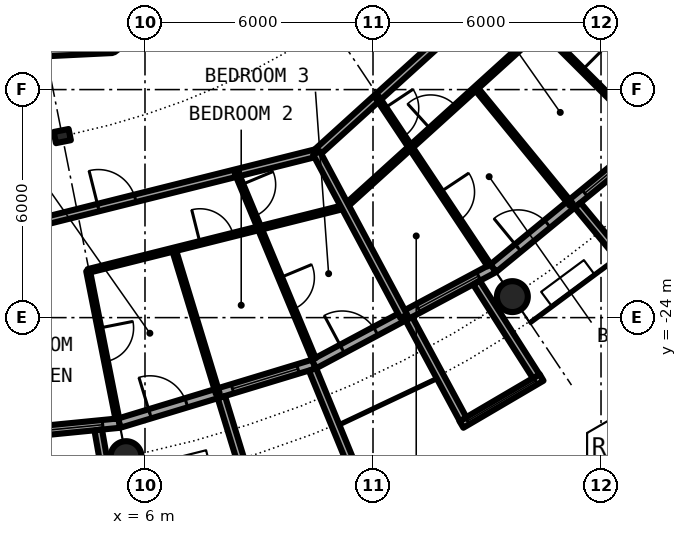
"""IFC4 building model, lengths in metres.
Left out: names, types, materials, properties, quantities, classifications, styles, units other than length and angle.
Written with IfcOpenShell. Run it as: python <this file> out.ifc"""

import sys

from ifc_helpers import new_model, si_unit, direction, frame, frame_2d, origin, origin_2d, place, context, subcontext, project, spatial, rectangle, circle, hollow_circle, i_section, extrude, element, fill, save


model = new_model("IFC4")
c1 = context("Model", 3, precision=1e-05, world=origin(), true_north=direction((0.0, 1.0)))
c2 = subcontext(c1, "Body", "Model", "MODEL_VIEW")
j1 = project(units=[si_unit("LENGTHUNIT", "METRE"), si_unit("PLANEANGLEUNIT", "RADIAN")], contexts=[c1])
p1 = place(None, origin())
s1 = spatial("IfcSite", under=j1, at=p1, CompositionType="ELEMENT")
p2 = place(p1, origin())
s2 = spatial("IfcBuilding", under=s1, at=p2, CompositionType="ELEMENT")
p3 = place(p2, frame((0.0, 0.0, 190.2)))
s3 = spatial("IfcBuildingStorey", under=s2, at=p3, CompositionType="ELEMENT", Elevation=190.2)
for number, where, z_axis, x_axis in (
    (1, (5.501, -27.658, 0.0), (0.0, 0.0, 1.0), (1.0, 0.0, 0.0)),
    (2, (15.667, -23.448, 0.0), (0.0, 0.0, 1.0), (1.0, 0.0, 0.0)),
):
    element("IfcColumn", number, at=place(p3, frame(where, z_axis=z_axis, x_axis=x_axis)), inside=s3, PredefinedType="COLUMN", context=c2, shape_type="SweptSolid", body=[
        extrude(hollow_circle(Radius=0.406, WallThickness=0.03, at=origin_2d()), origin(), (0.0, 0.0, 1.0), 3.05),
    ])
p4 = place(p3, frame((3.824, -19.223, 0.0), z_axis=(0.0, 0.0, 1.0), x_axis=(0.195090322016, -0.980785280403, 0.0)))
e3 = element("IfcColumn", 3, at=p4, inside=s3, PredefinedType="COLUMN", context=c2, shape_type="SweptSolid", body=[
    extrude(i_section(OverallWidth=0.3, OverallDepth=0.4, WebThickness=0.013, FlangeThickness=0.024, FilletRadius=0.027, at=origin_2d()), origin(), (0.0, 0.0, 1.0), 3.05),
])
p5 = place(p3, frame((0.0, -27.3, 0.0), z_axis=(0.0, 0.0, 1.0), x_axis=(0.995173996315, 0.098126026407, 0.0)))
e4 = element("IfcWall", 4, at=p5, inside=s3, PredefinedType="SOLIDWALL", context=c2, shape_type="SweptSolid", body=[
    extrude(rectangle(XDim=5.352, YDim=0.25, at=frame_2d((2.676, 0.0))), origin(), (0.0, 0.0, 1.0), 2.7),
])
p6 = place(p5, frame((0.841, 0.0, 0.0)))
e5 = element("IfcOpeningElement", 5, at=p6, cuts=e4, PredefinedType="OPENING", context=c2, shape_type="SweptSolid", body=[
    extrude(rectangle(XDim=1.0, YDim=2.2, at=frame_2d((0.5, 1.1))), frame((0.0, 0.135, 0.0), z_axis=(0.0, -1.0, 0.0), x_axis=(1.0, 0.0, 0.0)), (0.0, 0.0, 1.0), 0.27),
])
p7 = place(p5, frame((3.111, 0.0, 0.3)))
e6 = element("IfcOpeningElement", 6, at=p7, cuts=e4, PredefinedType="OPENING", context=c2, shape_type="SweptSolid", body=[
    extrude(rectangle(XDim=1.8, YDim=2.1, at=frame_2d((0.9, 1.05))), frame((0.0, 0.135, 0.0), z_axis=(0.0, -1.0, 0.0), x_axis=(1.0, 0.0, 0.0)), (0.0, 0.0, 1.0), 0.27),
])
p8 = place(p3, frame((4.769, -26.956, -0.03), z_axis=(0.0, 0.0, 1.0), x_axis=(0.174056778901, -0.984735618183, 0.0)))
e7 = element("IfcWall", 7, at=p8, inside=s3, PredefinedType="SOLIDWALL", context=c2, shape_type="SweptSolid", body=[
    extrude(rectangle(XDim=2.925, YDim=0.2, at=frame_2d((1.462, 0.0))), origin(), (0.0, 0.0, 1.0), 2.73),
])
p9 = place(p3, frame((5.326, -26.775, 0.0), z_axis=(0.0, 0.0, 1.0), x_axis=(0.956965678721, 0.290201119486, 0.0)))
e8 = element("IfcWall", 8, at=p9, inside=s3, PredefinedType="SOLIDWALL", context=c2, shape_type="SweptSolid", body=[
    extrude(rectangle(XDim=5.351, YDim=0.25, at=frame_2d((2.676, 0.0))), origin(), (0.0, 0.0, 1.0), 2.7),
])
p10 = place(p9, frame((0.841, 0.0, 0.0)))
e9 = element("IfcOpeningElement", 9, at=p10, cuts=e8, PredefinedType="OPENING", context=c2, shape_type="SweptSolid", body=[
    extrude(rectangle(XDim=1.0, YDim=2.2, at=frame_2d((0.5, 1.1))), frame((0.0, 0.135, 0.0), z_axis=(0.0, -1.0, 0.0), x_axis=(1.0, 0.0, 0.0)), (0.0, 0.0, 1.0), 0.27),
])
p11 = place(p9, frame((3.111, 0.0, 0.3)))
e10 = element("IfcOpeningElement", 10, at=p11, cuts=e8, PredefinedType="OPENING", context=c2, shape_type="SweptSolid", body=[
    extrude(rectangle(XDim=1.8, YDim=2.1, at=frame_2d((0.9, 1.05))), frame((0.0, 0.135, 0.0), z_axis=(0.0, -1.0, 0.0), x_axis=(1.0, 0.0, 0.0)), (0.0, 0.0, 1.0), 0.27),
])
p12 = place(p3, frame((8.009, -26.092, -0.03), z_axis=(0.0, 0.0, 1.0), x_axis=(0.293406695073, -0.955987715029, 0.0)))
e11 = element("IfcWall", 11, at=p12, inside=s3, PredefinedType="SOLIDWALL", context=c2, shape_type="SweptSolid", body=[
    extrude(rectangle(XDim=3.006, YDim=0.2, at=frame_2d((1.503, 0.0))), origin(), (0.0, 0.0, 1.0), 2.73),
])
p13 = place(p3, frame((10.409, -25.364, -0.03), z_axis=(0.0, 0.0, 1.0), x_axis=(0.379509886562, -0.925187681501, 0.0)))
e12 = element("IfcWall", 12, at=p13, inside=s3, PredefinedType="SOLIDWALL", context=c2, shape_type="SweptSolid", body=[
    extrude(rectangle(XDim=2.883, YDim=0.2, at=frame_2d((1.441, 0.0))), origin(), (0.0, 0.0, 1.0), 2.73),
])
p14 = place(p3, frame((10.447, -25.222, 0.0), z_axis=(0.0, 0.0, 1.0), x_axis=(0.881915646801, 0.471407246368, 0.0)))
e13 = element("IfcWall", 13, at=p14, inside=s3, PredefinedType="SOLIDWALL", context=c2, shape_type="SweptSolid", body=[
    extrude(rectangle(XDim=5.352, YDim=0.25, at=frame_2d((2.676, 0.0))), origin(), (0.0, 0.0, 1.0), 2.7),
])
p15 = place(p14, frame((0.841, 0.0, 0.0)))
e14 = element("IfcOpeningElement", 14, at=p15, cuts=e13, PredefinedType="OPENING", context=c2, shape_type="SweptSolid", body=[
    extrude(rectangle(XDim=1.0, YDim=2.2, at=frame_2d((0.5, 1.1))), frame((0.0, 0.135, 0.0), z_axis=(0.0, -1.0, 0.0), x_axis=(1.0, 0.0, 0.0)), (0.0, 0.0, 1.0), 0.27),
])
p16 = place(p14, frame((3.111, 0.0, 0.3)))
e15 = element("IfcOpeningElement", 15, at=p16, cuts=e13, PredefinedType="OPENING", context=c2, shape_type="SweptSolid", body=[
    extrude(rectangle(XDim=1.8, YDim=2.1, at=frame_2d((0.9, 1.05))), frame((0.0, 0.135, 0.0), z_axis=(0.0, -1.0, 0.0), x_axis=(1.0, 0.0, 0.0)), (0.0, 0.0, 1.0), 0.27),
])
p17 = place(p3, frame((14.327, -26.812, -0.03), z_axis=(0.0, 0.0, 1.0), x_axis=(0.862403467503, 0.506221551535, 0.0)))
e16 = element("IfcWall", 16, at=p17, inside=s3, PredefinedType="SOLIDWALL", context=c2, shape_type="SweptSolid", body=[
    extrude(rectangle(XDim=2.446, YDim=0.2, at=frame_2d((1.223, 0.0))), origin(), (0.0, 0.0, 1.0), 2.73),
])
p18 = place(p17, frame((0.183, 0.0, 0.33)))
e17 = element("IfcOpeningElement", 17, at=p18, cuts=e16, PredefinedType="OPENING", context=c2, shape_type="SweptSolid", body=[
    extrude(circle(Radius=1.04, at=frame_2d((1.04, 1.04))), frame((0.0, 0.11, 0.0), z_axis=(0.0, -1.0, 0.0), x_axis=(1.0, 0.0, 0.0)), (0.0, 0.0, 1.0), 0.22),
])
p19 = place(p3, frame((12.945, -24.029, -0.03), z_axis=(0.0, 0.0, 1.0), x_axis=(0.474424310775, -0.88029629861, 0.0)))
e18 = element("IfcWall", 18, at=p19, inside=s3, PredefinedType="SOLIDWALL", context=c2, shape_type="SweptSolid", body=[
    extrude(rectangle(XDim=3.006, YDim=0.2, at=frame_2d((1.503, 0.0))), origin(), (0.0, 0.0, 1.0), 2.73),
])
p20 = place(p3, frame((14.722, -23.079, -0.03), z_axis=(0.0, 0.0, 1.0), x_axis=(0.537572179146, -0.843217737129, 0.0)))
e19 = element("IfcWall", 19, at=p20, inside=s3, PredefinedType="SOLIDWALL", context=c2, shape_type="SweptSolid", body=[
    extrude(rectangle(XDim=2.924, YDim=0.2, at=frame_2d((1.462, 0.0))), origin(), (0.0, 0.0, 1.0), 2.73),
])
p21 = place(p3, frame((15.167, -22.699, 0.0), z_axis=(0.0, 0.0, 1.0), x_axis=(0.773019449054, 0.634382322723, 0.0)))
e20 = element("IfcWall", 20, at=p21, inside=s3, PredefinedType="SOLIDWALL", context=c2, shape_type="SweptSolid", body=[
    extrude(rectangle(XDim=5.352, YDim=0.25, at=frame_2d((2.676, 0.0))), origin(), (0.0, 0.0, 1.0), 2.7),
])
p22 = place(p21, frame((0.841, 0.0, 0.0)))
e21 = element("IfcOpeningElement", 21, at=p22, cuts=e20, PredefinedType="OPENING", context=c2, shape_type="SweptSolid", body=[
    extrude(rectangle(XDim=1.0, YDim=2.2, at=frame_2d((0.5, 1.1))), frame((0.0, 0.135, 0.0), z_axis=(0.0, -1.0, 0.0), x_axis=(1.0, 0.0, 0.0)), (0.0, 0.0, 1.0), 0.27),
])
p23 = place(p21, frame((3.111, 0.0, 0.3)))
e22 = element("IfcOpeningElement", 22, at=p23, cuts=e20, PredefinedType="OPENING", context=c2, shape_type="SweptSolid", body=[
    extrude(rectangle(XDim=1.8, YDim=2.1, at=frame_2d((0.9, 1.05))), frame((0.0, 0.135, 0.0), z_axis=(0.0, -1.0, 0.0), x_axis=(1.0, 0.0, 0.0)), (0.0, 0.0, 1.0), 0.27),
])
p24 = place(p3, frame((17.384, -21.041, -0.03), z_axis=(0.0, 0.0, 1.0), x_axis=(0.63709551667, -0.770784861449, 0.0)))
e23 = element("IfcWall", 23, at=p24, inside=s3, PredefinedType="SOLIDWALL", context=c2, shape_type="SweptSolid", body=[
    extrude(rectangle(XDim=3.006, YDim=0.2, at=frame_2d((1.503, 0.0))), origin(), (0.0, 0.0, 1.0), 2.73),
])
p25 = place(p3, frame((4.502, -22.773, 0.0), z_axis=(0.0, 0.0, 1.0), x_axis=(0.970080680347, 0.24278277043, 0.0)))
e24 = element("IfcWall", 24, at=p25, inside=s3, PredefinedType="PARTITIONING", context=c2, shape_type="SweptSolid", body=[
    extrude(rectangle(XDim=6.973, YDim=0.1, at=frame_2d((3.486, 0.0))), origin(), (0.0, 0.0, 1.0), 2.7),
])
p26 = place(p25, frame((3.037, 0.0, 0.0)))
e25 = element("IfcOpeningElement", 25, at=p26, cuts=e24, PredefinedType="OPENING", context=c2, shape_type="SweptSolid", body=[
    extrude(rectangle(XDim=0.9, YDim=2.3, at=frame_2d((0.45, 1.15))), frame((0.0, 0.06, 0.0), z_axis=(0.0, -1.0, 0.0), x_axis=(1.0, 0.0, 0.0)), (0.0, 0.0, 1.0), 0.12),
])
p27 = place(p3, frame((11.266, -21.078, 0.0), z_axis=(0.0, 0.0, 1.0), x_axis=(0.741084540886, 0.671411724101, 0.0)))
e26 = element("IfcWall", 26, at=p27, inside=s3, PredefinedType="PARTITIONING", context=c2, shape_type="SweptSolid", body=[
    extrude(rectangle(XDim=6.963, YDim=0.1, at=frame_2d((3.481, 0.0))), origin(), (0.0, 0.0, 1.0), 2.7),
])
p28 = place(p27, frame((3.035, 0.0, 0.0)))
e27 = element("IfcOpeningElement", 27, at=p28, cuts=e26, PredefinedType="OPENING", context=c2, shape_type="SweptSolid", body=[
    extrude(rectangle(XDim=0.9, YDim=2.3, at=frame_2d((0.45, 1.15))), frame((0.0, 0.06, 0.0), z_axis=(0.0, -1.0, 0.0), x_axis=(1.0, 0.0, 0.0)), (0.0, 0.0, 1.0), 0.12),
])
p29 = place(p3, frame((-0.005, -22.301, 0.0), z_axis=(0.0, 0.0, 1.0), x_axis=(0.970023226325, 0.243012222716, 0.0)))
e28 = element("IfcWall", 28, at=p29, inside=s3, PredefinedType="PARTITIONING", context=c2, shape_type="SweptSolid", body=[
    extrude(rectangle(XDim=10.847, YDim=0.2, at=frame_2d((5.424, 0.0))), origin(), (0.0, 0.0, 1.0), 2.7),
])
p30 = place(p29, frame((4.924, 0.0, 0.0)))
e29 = element("IfcOpeningElement", 29, at=p30, cuts=e28, PredefinedType="OPENING", context=c2, shape_type="SweptSolid", body=[
    extrude(rectangle(XDim=1.0, YDim=2.3, at=frame_2d((0.5, 1.15))), frame((0.0, 0.11, 0.0), z_axis=(0.0, -1.0, 0.0), x_axis=(1.0, 0.0, 0.0)), (0.0, 0.0, 1.0), 0.22),
])
p31 = place(p3, frame((10.51, -19.669, 0.0), z_axis=(0.0, 0.0, 1.0), x_axis=(0.74093897184, 0.671572363941, 0.0)))
e30 = element("IfcWall", 30, at=p31, inside=s3, PredefinedType="PARTITIONING", context=c2, shape_type="SweptSolid", body=[
    extrude(rectangle(XDim=10.84, YDim=0.2, at=frame_2d((5.42, 0.0))), origin(), (0.0, 0.0, 1.0), 2.7),
])
p32 = place(p31, frame((4.922, 0.0, 0.0)))
e31 = element("IfcOpeningElement", 31, at=p32, cuts=e30, PredefinedType="OPENING", context=c2, shape_type="SweptSolid", body=[
    extrude(rectangle(XDim=1.0, YDim=2.3, at=frame_2d((0.5, 1.15))), frame((0.0, 0.11, 0.0), z_axis=(0.0, -1.0, 0.0), x_axis=(1.0, 0.0, 0.0)), (0.0, 0.0, 1.0), 0.22),
])
p33 = place(p3, frame((-3.453, -17.361, 0.0), z_axis=(0.0, 0.0, 1.0), x_axis=(0.998789433108, 0.049190124121, 0.0)))
e32 = element("IfcWall", 32, at=p33, inside=s3, PredefinedType="PARTITIONING", context=c2, shape_type="SweptSolid", body=[
    extrude(rectangle(XDim=8.601, YDim=0.2, at=frame_2d((4.301, 0.0))), origin(), (0.0, 0.0, 1.0), 2.7),
])
p34 = place(p33, frame((3.803, 0.0, 0.0)))
e33 = element("IfcOpeningElement", 33, at=p34, cuts=e32, PredefinedType="OPENING", context=c2, shape_type="SweptSolid", body=[
    extrude(rectangle(XDim=1.0, YDim=2.3, at=frame_2d((0.5, 1.15))), frame((0.0, 0.11, 0.0), z_axis=(0.0, -1.0, 0.0), x_axis=(1.0, 0.0, 0.0)), (0.0, 0.0, 1.0), 0.22),
])
p35 = place(p3, frame((4.503, -22.772, 0.0), z_axis=(0.0, 0.0, 1.0), x_axis=(0.194089507313, -0.980983824103, 0.0)))
e34 = element("IfcWall", 34, at=p35, inside=s3, PredefinedType="PARTITIONING", context=c2, shape_type="SweptSolid", body=[
    extrude(rectangle(XDim=3.962, YDim=0.1, at=frame_2d((1.981, 0.0))), origin(), (0.0, 0.0, 1.0), 2.7),
])
p36 = place(p35, frame((1.531, 0.0, 0.0)))
e35 = element("IfcOpeningElement", 35, at=p36, cuts=e34, PredefinedType="OPENING", context=c2, shape_type="SweptSolid", body=[
    extrude(rectangle(XDim=0.9, YDim=2.3, at=frame_2d((0.45, 1.15))), frame((0.0, 0.06, 0.0), z_axis=(0.0, -1.0, 0.0), x_axis=(1.0, 0.0, 0.0)), (0.0, 0.0, 1.0), 0.12),
])
p37 = place(p3, frame((6.76, -22.207, 0.0), z_axis=(0.0, 0.0, 1.0), x_axis=(0.291291575636, -0.956634317785, 0.0)))
e36 = element("IfcWall", 36, at=p37, inside=s3, PredefinedType="PARTITIONING", context=c2, shape_type="SweptSolid", body=[
    extrude(rectangle(XDim=3.962, YDim=0.1, at=frame_2d((1.981, 0.0))), origin(), (0.0, 0.0, 1.0), 2.7),
])
p38 = place(p3, frame((8.41, -20.193, 0.0), z_axis=(0.0, 0.0, 1.0), x_axis=(0.384363513821, -0.923181828917, 0.0)))
e37 = element("IfcWall", 37, at=p38, inside=s3, PredefinedType="PARTITIONING", context=c2, shape_type="SweptSolid", body=[
    extrude(rectangle(XDim=5.3, YDim=0.1, at=frame_2d((2.65, 0.0))), origin(), (0.0, 0.0, 1.0), 2.7),
])
p39 = place(p38, frame((0.335, 0.0, 0.0)))
e38 = element("IfcOpeningElement", 38, at=p39, cuts=e37, PredefinedType="OPENING", context=c2, shape_type="SweptSolid", body=[
    extrude(rectangle(XDim=0.9, YDim=2.3, at=frame_2d((0.45, 1.15))), frame((0.0, 0.06, 0.0), z_axis=(0.0, -1.0, 0.0), x_axis=(1.0, 0.0, 0.0)), (0.0, 0.0, 1.0), 0.12),
])
p40 = place(p38, frame((2.985, 0.0, 0.0)))
e39 = element("IfcOpeningElement", 39, at=p40, cuts=e37, PredefinedType="OPENING", context=c2, shape_type="SweptSolid", body=[
    extrude(rectangle(XDim=0.9, YDim=2.3, at=frame_2d((0.45, 1.15))), frame((0.0, 0.06, 0.0), z_axis=(0.0, -1.0, 0.0), x_axis=(1.0, 0.0, 0.0)), (0.0, 0.0, 1.0), 0.12),
])
p41 = place(p3, frame((10.512, -19.667, 0.0), z_axis=(0.0, 0.0, 1.0), x_axis=(0.471427642527, -0.881904744211, 0.0)))
e40 = element("IfcWall", 40, at=p41, inside=s3, PredefinedType="PARTITIONING", context=c2, shape_type="SweptSolid", body=[
    extrude(rectangle(XDim=4.875, YDim=0.2, at=frame_2d((2.438, 0.0))), origin(), (0.0, 0.0, 1.0), 2.7),
])
p42 = place(p3, frame((12.118, -18.211, 0.0), z_axis=(0.0, 0.0, 1.0), x_axis=(0.554126060637, -0.832432765407, 0.0)))
e41 = element("IfcWall", 41, at=p42, inside=s3, PredefinedType="PARTITIONING", context=c2, shape_type="SweptSolid", body=[
    extrude(rectangle(XDim=5.3, YDim=0.1, at=frame_2d((2.65, 0.0))), origin(), (0.0, 0.0, 1.0), 2.7),
])
p43 = place(p42, frame((0.335, 0.0, 0.0)))
e42 = element("IfcOpeningElement", 42, at=p43, cuts=e41, PredefinedType="OPENING", context=c2, shape_type="SweptSolid", body=[
    extrude(rectangle(XDim=0.9, YDim=2.3, at=frame_2d((0.45, 1.15))), frame((0.0, 0.06, 0.0), z_axis=(0.0, -1.0, 0.0), x_axis=(1.0, 0.0, 0.0)), (0.0, 0.0, 1.0), 0.12),
])
p44 = place(p42, frame((2.985, 0.0, 0.0)))
e43 = element("IfcOpeningElement", 43, at=p44, cuts=e41, PredefinedType="OPENING", context=c2, shape_type="SweptSolid", body=[
    extrude(rectangle(XDim=0.9, YDim=2.3, at=frame_2d((0.45, 1.15))), frame((0.0, 0.06, 0.0), z_axis=(0.0, -1.0, 0.0), x_axis=(1.0, 0.0, 0.0)), (0.0, 0.0, 1.0), 0.12),
])
p45 = place(p3, frame((14.706, -17.961, 0.0), z_axis=(0.0, 0.0, 1.0), x_axis=(0.633590098448, -0.773668913133, 0.0)))
e44 = element("IfcWall", 44, at=p45, inside=s3, PredefinedType="PARTITIONING", context=c2, shape_type="SweptSolid", body=[
    extrude(rectangle(XDim=3.962, YDim=0.1, at=frame_2d((1.981, 0.0))), origin(), (0.0, 0.0, 1.0), 2.7),
])
p46 = place(p3, frame((16.427, -16.401, 0.0), z_axis=(0.0, 0.0, 1.0), x_axis=(0.707722727509, -0.706490297858, 0.0)))
e45 = element("IfcWall", 45, at=p46, inside=s3, PredefinedType="PARTITIONING", context=c2, shape_type="SweptSolid", body=[
    extrude(rectangle(XDim=3.962, YDim=0.1, at=frame_2d((1.981, 0.0))), origin(), (0.0, 0.0, 1.0), 2.7),
])
p47 = place(p46, frame((1.531, 0.0, 0.0)))
e46 = element("IfcOpeningElement", 46, at=p47, cuts=e45, PredefinedType="OPENING", context=c2, shape_type="SweptSolid", body=[
    extrude(rectangle(XDim=0.9, YDim=2.3, at=frame_2d((0.45, 1.15))), frame((0.0, 0.06, 0.0), z_axis=(0.0, -1.0, 0.0), x_axis=(1.0, 0.0, 0.0)), (0.0, 0.0, 1.0), 0.12),
])
p48 = place(p7, origin())
e47 = element("IfcWindow", 47, at=p48, inside=s3, PartitioningType="SINGLE_PANEL", PredefinedType="WINDOW", context=c2, shape_type="SweptSolid", body=[
    extrude(rectangle(XDim=1.8, YDim=2.1, at=frame_2d((0.9, 1.05))), frame((0.0, 0.03, 0.0), z_axis=(0.0, -1.0, 0.0), x_axis=(1.0, 0.0, 0.0)), (0.0, 0.0, 1.0), 0.06),
])
fill(e6, e47)
p49 = place(p10, origin())
e48 = element("IfcDoor", 48, at=p49, inside=s3, OperationType="SINGLE_SWING_LEFT", PredefinedType="DOOR", context=c2, shape_type="SweptSolid", body=[
    extrude(rectangle(XDim=1.0, YDim=2.2, at=frame_2d((0.5, 1.1))), frame((0.0, 0.025, 0.0), z_axis=(0.0, -1.0, 0.0), x_axis=(1.0, 0.0, 0.0)), (0.0, 0.0, 1.0), 0.05),
])
fill(e9, e48)
p50 = place(p11, origin())
e49 = element("IfcWindow", 49, at=p50, inside=s3, PartitioningType="SINGLE_PANEL", PredefinedType="WINDOW", context=c2, shape_type="SweptSolid", body=[
    extrude(rectangle(XDim=1.8, YDim=2.1, at=frame_2d((0.9, 1.05))), frame((0.0, 0.03, 0.0), z_axis=(0.0, -1.0, 0.0), x_axis=(1.0, 0.0, 0.0)), (0.0, 0.0, 1.0), 0.06),
])
fill(e10, e49)
p51 = place(p15, origin())
e50 = element("IfcDoor", 50, at=p51, inside=s3, OperationType="SINGLE_SWING_LEFT", PredefinedType="DOOR", context=c2, shape_type="SweptSolid", body=[
    extrude(rectangle(XDim=1.0, YDim=2.2, at=frame_2d((0.5, 1.1))), frame((0.0, 0.025, 0.0), z_axis=(0.0, -1.0, 0.0), x_axis=(1.0, 0.0, 0.0)), (0.0, 0.0, 1.0), 0.05),
])
fill(e14, e50)
p52 = place(p16, origin())
e51 = element("IfcWindow", 51, at=p52, inside=s3, PartitioningType="SINGLE_PANEL", PredefinedType="WINDOW", context=c2, shape_type="SweptSolid", body=[
    extrude(rectangle(XDim=1.8, YDim=2.1, at=frame_2d((0.9, 1.05))), frame((0.0, 0.03, 0.0), z_axis=(0.0, -1.0, 0.0), x_axis=(1.0, 0.0, 0.0)), (0.0, 0.0, 1.0), 0.06),
])
fill(e15, e51)
p53 = place(p18, origin())
e52 = element("IfcWindow", 52, at=p53, inside=s3, PartitioningType="SINGLE_PANEL", PredefinedType="WINDOW", context=c2, shape_type="SweptSolid", body=[
    extrude(circle(Radius=1.04, at=frame_2d((1.04, 1.04))), frame((0.0, 0.03, 0.0), z_axis=(0.0, -1.0, 0.0), x_axis=(1.0, 0.0, 0.0)), (0.0, 0.0, 1.0), 0.06),
])
fill(e17, e52)
p54 = place(p22, origin())
e53 = element("IfcDoor", 53, at=p54, inside=s3, OperationType="SINGLE_SWING_LEFT", PredefinedType="DOOR", context=c2, shape_type="SweptSolid", body=[
    extrude(rectangle(XDim=1.0, YDim=2.2, at=frame_2d((0.5, 1.1))), frame((0.0, 0.025, 0.0), z_axis=(0.0, -1.0, 0.0), x_axis=(1.0, 0.0, 0.0)), (0.0, 0.0, 1.0), 0.05),
])
fill(e21, e53)
p55 = place(p23, origin())
e54 = element("IfcWindow", 54, at=p55, inside=s3, PartitioningType="SINGLE_PANEL", PredefinedType="WINDOW", context=c2, shape_type="SweptSolid", body=[
    extrude(rectangle(XDim=1.8, YDim=2.1, at=frame_2d((0.9, 1.05))), frame((0.0, 0.03, 0.0), z_axis=(0.0, -1.0, 0.0), x_axis=(1.0, 0.0, 0.0)), (0.0, 0.0, 1.0), 0.06),
])
fill(e22, e54)
p56 = place(p30, origin())
e55 = element("IfcDoor", 55, at=p56, inside=s3, OperationType="SINGLE_SWING_RIGHT", PredefinedType="DOOR", context=c2, shape_type="SweptSolid", body=[
    extrude(rectangle(XDim=1.0, YDim=2.3, at=frame_2d((0.5, 1.15))), frame((0.0, 0.025, 0.0), z_axis=(0.0, -1.0, 0.0), x_axis=(1.0, 0.0, 0.0)), (0.0, 0.0, 1.0), 0.05),
])
fill(e29, e55)
p57 = place(p39, origin())
e56 = element("IfcDoor", 56, at=p57, inside=s3, OperationType="SINGLE_SWING_LEFT", PredefinedType="DOOR", context=c2, shape_type="SweptSolid", body=[
    extrude(rectangle(XDim=0.9, YDim=2.3, at=frame_2d((0.45, 1.15))), frame((0.0, 0.025, 0.0), z_axis=(0.0, -1.0, 0.0), x_axis=(1.0, 0.0, 0.0)), (0.0, 0.0, 1.0), 0.05),
])
fill(e38, e56)
p58 = place(p36, origin())
e57 = element("IfcDoor", 57, at=p58, inside=s3, OperationType="SINGLE_SWING_LEFT", PredefinedType="DOOR", context=c2, shape_type="SweptSolid", body=[
    extrude(rectangle(XDim=0.9, YDim=2.3, at=frame_2d((0.45, 1.15))), frame((0.0, 0.025, 0.0), z_axis=(0.0, -1.0, 0.0), x_axis=(1.0, 0.0, 0.0)), (0.0, 0.0, 1.0), 0.05),
])
fill(e35, e57)
p59 = place(p26, origin())
e58 = element("IfcDoor", 58, at=p59, inside=s3, OperationType="SINGLE_SWING_RIGHT", PredefinedType="DOOR", context=c2, shape_type="SweptSolid", body=[
    extrude(rectangle(XDim=0.9, YDim=2.3, at=frame_2d((0.45, 1.15))), frame((0.0, 0.025, 0.0), z_axis=(0.0, -1.0, 0.0), x_axis=(1.0, 0.0, 0.0)), (0.0, 0.0, 1.0), 0.05),
])
fill(e25, e58)
p60 = place(p40, origin())
e59 = element("IfcDoor", 59, at=p60, inside=s3, OperationType="SINGLE_SWING_RIGHT", PredefinedType="DOOR", context=c2, shape_type="SweptSolid", body=[
    extrude(rectangle(XDim=0.9, YDim=2.3, at=frame_2d((0.45, 1.15))), frame((0.0, 0.025, 0.0), z_axis=(0.0, -1.0, 0.0), x_axis=(1.0, 0.0, 0.0)), (0.0, 0.0, 1.0), 0.05),
])
fill(e39, e59)
p61 = place(p43, origin())
e60 = element("IfcDoor", 60, at=p61, inside=s3, OperationType="SINGLE_SWING_LEFT", PredefinedType="DOOR", context=c2, shape_type="SweptSolid", body=[
    extrude(rectangle(XDim=0.9, YDim=2.3, at=frame_2d((0.45, 1.15))), frame((0.0, 0.025, 0.0), z_axis=(0.0, -1.0, 0.0), x_axis=(1.0, 0.0, 0.0)), (0.0, 0.0, 1.0), 0.05),
])
fill(e42, e60)
p62 = place(p47, origin())
e61 = element("IfcDoor", 61, at=p62, inside=s3, OperationType="SINGLE_SWING_RIGHT", PredefinedType="DOOR", context=c2, shape_type="SweptSolid", body=[
    extrude(rectangle(XDim=0.9, YDim=2.3, at=frame_2d((0.45, 1.15))), frame((0.0, 0.025, 0.0), z_axis=(0.0, -1.0, 0.0), x_axis=(1.0, 0.0, 0.0)), (0.0, 0.0, 1.0), 0.05),
])
fill(e46, e61)
p63 = place(p28, origin())
e62 = element("IfcDoor", 62, at=p63, inside=s3, OperationType="SINGLE_SWING_RIGHT", PredefinedType="DOOR", context=c2, shape_type="SweptSolid", body=[
    extrude(rectangle(XDim=0.9, YDim=2.3, at=frame_2d((0.45, 1.15))), frame((0.0, 0.025, 0.0), z_axis=(0.0, -1.0, 0.0), x_axis=(1.0, 0.0, 0.0)), (0.0, 0.0, 1.0), 0.05),
])
fill(e27, e62)
p64 = place(p44, origin())
e63 = element("IfcDoor", 63, at=p64, inside=s3, OperationType="SINGLE_SWING_RIGHT", PredefinedType="DOOR", context=c2, shape_type="SweptSolid", body=[
    extrude(rectangle(XDim=0.9, YDim=2.3, at=frame_2d((0.45, 1.15))), frame((0.0, 0.025, 0.0), z_axis=(0.0, -1.0, 0.0), x_axis=(1.0, 0.0, 0.0)), (0.0, 0.0, 1.0), 0.05),
])
fill(e43, e63)
save(model, sys.argv[1])
